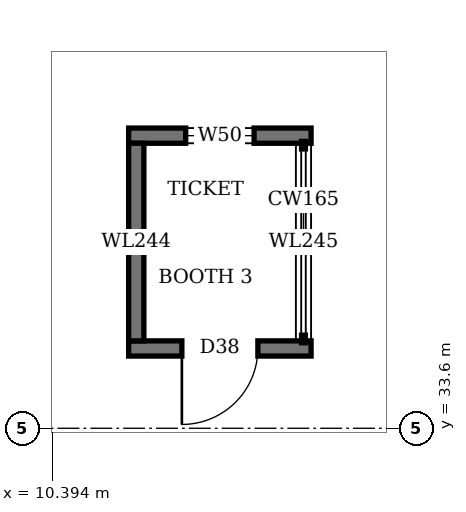
"""IFC4 building model, lengths in metres.
Left out: names, types, materials, properties, quantities, classifications, styles, units other than length and angle.
Written with IfcOpenShell. Run it as: python <this file> out.ifc"""

import sys

from ifc_helpers import new_model, si_unit, direction, frame, frame_2d, origin, place, context, subcontext, project, spatial, rectangle, extrude, element, fill, save


model = new_model("IFC4")
c1 = context("Model", 3, precision=1e-05, world=origin(), true_north=direction((0.0, 1.0)))
c2 = subcontext(c1, "Body", "Model", "MODEL_VIEW")
j1 = project(units=[si_unit("LENGTHUNIT", "METRE"), si_unit("PLANEANGLEUNIT", "RADIAN")], contexts=[c1])
p1 = place(None, origin())
s1 = spatial("IfcSite", under=j1, at=p1, CompositionType="ELEMENT")
p2 = place(p1, origin())
s2 = spatial("IfcBuilding", under=s1, at=p2, CompositionType="ELEMENT")
p3 = place(p2, origin())
s3 = spatial("IfcBuildingStorey", under=s2, at=p3, CompositionType="ELEMENT", Elevation=0.0)
p4 = place(p3, frame((11.4, 34.65, 0.0), z_axis=(0.0, 0.0, 1.0), x_axis=(1.0, 0.0, 0.0)))
e1 = element("IfcWall", 1, at=p4, inside=s3, PredefinedType="SOLIDWALL", context=c2, shape_type="SweptSolid", body=[
    extrude(rectangle(XDim=2.4, YDim=0.2, at=frame_2d((1.2, 0.0))), origin(), (0.0, 0.0, 1.0), 2.65),
])
p5 = place(p4, frame((0.7, 0.0, 0.0)))
e2 = element("IfcOpeningElement", 2, at=p5, cuts=e1, PredefinedType="OPENING", context=c2, shape_type="SweptSolid", body=[
    extrude(rectangle(XDim=1.0, YDim=2.1, at=frame_2d((0.5, 1.05))), frame((0.0, 0.11, 0.0), z_axis=(0.0, -1.0, 0.0), x_axis=(1.0, 0.0, 0.0)), (0.0, 0.0, 1.0), 0.22),
])
p6 = place(p3, frame((11.4, 37.45, 0.0), z_axis=(0.0, 0.0, 1.0), x_axis=(1.0, 0.0, 0.0)))
e3 = element("IfcWall", 3, at=p6, inside=s3, PredefinedType="SOLIDWALL", context=c2, shape_type="SweptSolid", body=[
    extrude(rectangle(XDim=2.4, YDim=0.2, at=frame_2d((1.2, 0.0))), origin(), (0.0, 0.0, 1.0), 2.65),
])
p7 = place(p6, frame((0.75, 0.0, 0.9)))
e4 = element("IfcOpeningElement", 4, at=p7, cuts=e3, PredefinedType="OPENING", context=c2, shape_type="SweptSolid", body=[
    extrude(rectangle(XDim=0.9, YDim=1.2, at=frame_2d((0.45, 0.6))), frame((0.0, 0.11, 0.0), z_axis=(0.0, -1.0, 0.0), x_axis=(1.0, 0.0, 0.0)), (0.0, 0.0, 1.0), 0.22),
])
p8 = place(p3, frame((11.5, 34.75, 0.0), z_axis=(0.0, 0.0, 1.0), x_axis=(0.0, 1.0, 0.0)))
e5 = element("IfcWall", 5, at=p8, inside=s3, PredefinedType="SOLIDWALL", context=c2, shape_type="SweptSolid", body=[
    extrude(rectangle(XDim=2.6, YDim=0.2, at=frame_2d((1.3, 0.0))), origin(), (0.0, 0.0, 1.0), 2.65),
])
p9 = place(p3, frame((13.7, 34.75, 0.0), z_axis=(0.0, 0.0, 1.0), x_axis=(0.0, 1.0, 0.0)))
e6 = element("IfcWall", 6, at=p9, inside=s3, PredefinedType="SOLIDWALL", context=c2, shape_type="SweptSolid", body=[
    extrude(rectangle(XDim=2.6, YDim=0.2, at=frame_2d((1.3, 0.0))), origin(), (0.0, 0.0, 1.0), 1.0),
])
p10 = place(p5, frame((1.0, 0.0, 0.0), z_axis=(0.0, 0.0, 1.0), x_axis=(-1.0, 0.0, 0.0)))
e7 = element("IfcDoor", 7, at=p10, inside=s3, OperationType="SINGLE_SWING_RIGHT", PredefinedType="DOOR", context=c2, shape_type="SweptSolid", body=[
    extrude(rectangle(XDim=1.0, YDim=2.1, at=frame_2d((0.5, 1.05))), frame((0.0, 0.025, 0.0), z_axis=(0.0, -1.0, 0.0), x_axis=(1.0, 0.0, 0.0)), (0.0, 0.0, 1.0), 0.05),
])
fill(e2, e7)
p11 = place(p7, origin())
e8 = element("IfcWindow", 8, at=p11, inside=s3, PartitioningType="SINGLE_PANEL", PredefinedType="WINDOW", context=c2, shape_type="SweptSolid", body=[
    extrude(rectangle(XDim=0.9, YDim=1.2, at=frame_2d((0.45, 0.6))), frame((0.0, 0.03, 0.0), z_axis=(0.0, -1.0, 0.0), x_axis=(1.0, 0.0, 0.0)), (0.0, 0.0, 1.0), 0.06),
])
fill(e4, e8)
save(model, sys.argv[1])
